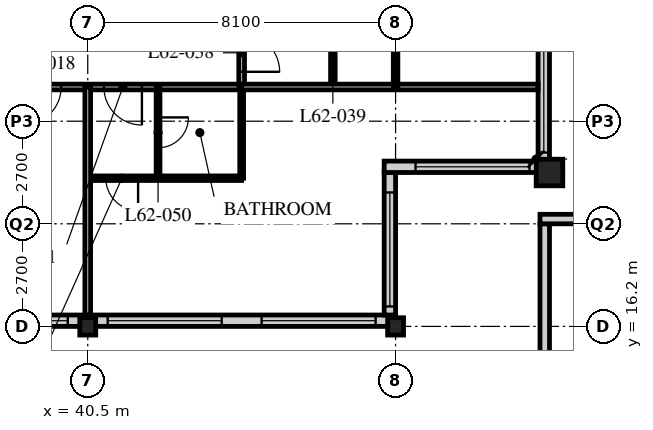
"""IFC4 building model, lengths in metres.
Left out: names, types, materials, properties, quantities, classifications, styles, units other than length and angle.
Written with IfcOpenShell. Run it as: python <this file> out.ifc"""

import sys

from ifc_helpers import new_model, si_unit, direction, frame, frame_2d, origin, origin_2d, place, context, subcontext, project, spatial, rectangle, hollow_rectangle, i_section, extrude, element, fill, save


model = new_model("IFC4")
c1 = context("Model", 3, precision=1e-05, world=origin(), true_north=direction((0.0, 1.0)))
c2 = subcontext(c1, "Body", "Model", "MODEL_VIEW")
j1 = project(units=[si_unit("LENGTHUNIT", "METRE"), si_unit("PLANEANGLEUNIT", "RADIAN")], contexts=[c1])
p1 = place(None, origin())
s1 = spatial("IfcSite", under=j1, at=p1, CompositionType="ELEMENT")
p2 = place(p1, origin())
s2 = spatial("IfcBuilding", under=s1, at=p2, CompositionType="ELEMENT")
p3 = place(p2, frame((0.0, 0.0, 242.4)))
s3 = spatial("IfcBuildingStorey", under=s2, at=p3, CompositionType="ELEMENT", Elevation=242.4)
for number, where, z_axis, x_axis in (
    (1, (40.5, 16.2, 0.0), (0.0, 0.0, 1.0), (1.0, 0.0, 0.0)),
    (2, (48.6, 16.2, 0.0), (0.0, 0.0, 1.0), (1.0, 0.0, 0.0)),
):
    element("IfcColumn", number, at=place(p3, frame(where, z_axis=z_axis, x_axis=x_axis)), inside=s3, PredefinedType="COLUMN", context=c2, shape_type="SweptSolid", body=[
        extrude(i_section(OverallWidth=0.418, OverallDepth=0.456, WebThickness=0.042, FlangeThickness=0.067, FilletRadius=0.015, at=origin_2d()), origin(), (0.0, 0.0, 1.0), 3.9),
    ])
p4 = place(p3, frame((52.65, 20.25, 0.0), z_axis=(0.0, 0.0, 1.0), x_axis=(1.0, 0.0, 0.0)))
e3 = element("IfcColumn", 3, at=p4, inside=s3, PredefinedType="COLUMN", context=c2, shape_type="SweptSolid", body=[
    extrude(hollow_rectangle(XDim=0.7, YDim=0.7, WallThickness=0.07, at=origin_2d()), origin(), (0.0, 0.0, 1.0), 3.9),
])
p5 = place(p3, frame((8.4, 16.35, 0.0), z_axis=(0.0, 0.0, 1.0), x_axis=(1.0, 0.0, 0.0)))
e4 = element("IfcWall", 4, at=p5, inside=s3, PredefinedType="SOLIDWALL", context=c2, shape_type="SweptSolid", body=[
    extrude(rectangle(XDim=40.2, YDim=0.3, at=frame_2d((20.1, 0.0))), origin(), (0.0, 0.0, 1.0), 3.69),
])
p6 = place(p5, frame((21.475, 0.0, 0.0)))
e5 = element("IfcOpeningElement", 5, at=p6, cuts=e4, PredefinedType="OPENING", context=c2, shape_type="SweptSolid", body=[
    extrude(rectangle(XDim=1.0, YDim=2.1, at=frame_2d((0.5, 1.05))), frame((0.0, 0.16, 0.0), z_axis=(0.0, -1.0, 0.0), x_axis=(1.0, 0.0, 0.0)), (0.0, 0.0, 1.0), 0.32),
])
p7 = place(p5, frame((0.225, 0.0, 0.6)))
e6 = element("IfcOpeningElement", 6, at=p7, cuts=e4, PredefinedType="OPENING", context=c2, shape_type="SweptSolid", body=[
    extrude(rectangle(XDim=3.0, YDim=2.3, at=frame_2d((1.5, 1.15))), frame((0.0, 0.16, 0.0), z_axis=(0.0, -1.0, 0.0), x_axis=(1.0, 0.0, 0.0)), (0.0, 0.0, 1.0), 0.32),
])
p8 = place(p5, frame((4.275, 0.0, 0.6)))
e7 = element("IfcOpeningElement", 7, at=p8, cuts=e4, PredefinedType="OPENING", context=c2, shape_type="SweptSolid", body=[
    extrude(rectangle(XDim=3.0, YDim=2.3, at=frame_2d((1.5, 1.15))), frame((0.0, 0.16, 0.0), z_axis=(0.0, -1.0, 0.0), x_axis=(1.0, 0.0, 0.0)), (0.0, 0.0, 1.0), 0.32),
])
p9 = place(p5, frame((8.325, 0.0, 0.6)))
e8 = element("IfcOpeningElement", 8, at=p9, cuts=e4, PredefinedType="OPENING", context=c2, shape_type="SweptSolid", body=[
    extrude(rectangle(XDim=3.0, YDim=2.3, at=frame_2d((1.5, 1.15))), frame((0.0, 0.16, 0.0), z_axis=(0.0, -1.0, 0.0), x_axis=(1.0, 0.0, 0.0)), (0.0, 0.0, 1.0), 0.32),
])
p10 = place(p5, frame((12.375, 0.0, 0.6)))
e9 = element("IfcOpeningElement", 9, at=p10, cuts=e4, PredefinedType="OPENING", context=c2, shape_type="SweptSolid", body=[
    extrude(rectangle(XDim=3.0, YDim=2.3, at=frame_2d((1.5, 1.15))), frame((0.0, 0.16, 0.0), z_axis=(0.0, -1.0, 0.0), x_axis=(1.0, 0.0, 0.0)), (0.0, 0.0, 1.0), 0.32),
])
p11 = place(p5, frame((16.425, 0.0, 0.6)))
e10 = element("IfcOpeningElement", 10, at=p11, cuts=e4, PredefinedType="OPENING", context=c2, shape_type="SweptSolid", body=[
    extrude(rectangle(XDim=3.0, YDim=2.3, at=frame_2d((1.5, 1.15))), frame((0.0, 0.16, 0.0), z_axis=(0.0, -1.0, 0.0), x_axis=(1.0, 0.0, 0.0)), (0.0, 0.0, 1.0), 0.32),
])
p12 = place(p5, frame((24.525, 0.0, 0.6)))
e11 = element("IfcOpeningElement", 11, at=p12, cuts=e4, PredefinedType="OPENING", context=c2, shape_type="SweptSolid", body=[
    extrude(rectangle(XDim=3.0, YDim=2.3, at=frame_2d((1.5, 1.15))), frame((0.0, 0.16, 0.0), z_axis=(0.0, -1.0, 0.0), x_axis=(1.0, 0.0, 0.0)), (0.0, 0.0, 1.0), 0.32),
])
p13 = place(p5, frame((28.575, 0.0, 0.6)))
e12 = element("IfcOpeningElement", 12, at=p13, cuts=e4, PredefinedType="OPENING", context=c2, shape_type="SweptSolid", body=[
    extrude(rectangle(XDim=3.0, YDim=2.3, at=frame_2d((1.5, 1.15))), frame((0.0, 0.16, 0.0), z_axis=(0.0, -1.0, 0.0), x_axis=(1.0, 0.0, 0.0)), (0.0, 0.0, 1.0), 0.32),
])
p14 = place(p5, frame((32.625, 0.0, 0.6)))
e13 = element("IfcOpeningElement", 13, at=p14, cuts=e4, PredefinedType="OPENING", context=c2, shape_type="SweptSolid", body=[
    extrude(rectangle(XDim=3.0, YDim=2.3, at=frame_2d((1.5, 1.15))), frame((0.0, 0.16, 0.0), z_axis=(0.0, -1.0, 0.0), x_axis=(1.0, 0.0, 0.0)), (0.0, 0.0, 1.0), 0.32),
])
p15 = place(p5, frame((36.675, 0.0, 0.6)))
e14 = element("IfcOpeningElement", 14, at=p15, cuts=e4, PredefinedType="OPENING", context=c2, shape_type="SweptSolid", body=[
    extrude(rectangle(XDim=3.0, YDim=2.3, at=frame_2d((1.5, 1.15))), frame((0.0, 0.16, 0.0), z_axis=(0.0, -1.0, 0.0), x_axis=(1.0, 0.0, 0.0)), (0.0, 0.0, 1.0), 0.32),
])
p16 = place(p3, frame((48.45, 16.5, 0.0), z_axis=(0.0, 0.0, 1.0), x_axis=(0.0, 1.0, 0.0)))
e15 = element("IfcWall", 15, at=p16, inside=s3, PredefinedType="SOLIDWALL", context=c2, shape_type="SweptSolid", body=[
    extrude(rectangle(XDim=3.75, YDim=0.3, at=frame_2d((1.875, 0.0))), origin(), (0.0, 0.0, 1.0), 3.69),
])
p17 = place(p16, frame((0.225, 0.0, 0.6)))
e16 = element("IfcOpeningElement", 16, at=p17, cuts=e15, PredefinedType="OPENING", context=c2, shape_type="SweptSolid", body=[
    extrude(rectangle(XDim=3.0, YDim=2.3, at=frame_2d((1.5, 1.15))), frame((0.0, 0.16, 0.0), z_axis=(0.0, -1.0, 0.0), x_axis=(1.0, 0.0, 0.0)), (0.0, 0.0, 1.0), 0.32),
])
p18 = place(p3, frame((48.3, 20.4, 0.0), z_axis=(0.0, 0.0, 1.0), x_axis=(1.0, 0.0, 0.0)))
e17 = element("IfcWall", 17, at=p18, inside=s3, PredefinedType="SOLIDWALL", context=c2, shape_type="SweptSolid", body=[
    extrude(rectangle(XDim=4.35, YDim=0.3, at=frame_2d((2.175, 0.0))), origin(), (0.0, 0.0, 1.0), 3.69),
])
p19 = place(p18, frame((0.825, 0.0, 0.6)))
e18 = element("IfcOpeningElement", 18, at=p19, cuts=e17, PredefinedType="OPENING", context=c2, shape_type="SweptSolid", body=[
    extrude(rectangle(XDim=3.0, YDim=2.3, at=frame_2d((1.5, 1.15))), frame((0.0, 0.16, 0.0), z_axis=(0.0, -1.0, 0.0), x_axis=(1.0, 0.0, 0.0)), (0.0, 0.0, 1.0), 0.32),
])
p20 = place(p3, frame((52.5, 20.55, 0.0), z_axis=(0.0, 0.0, 1.0), x_axis=(0.0, 1.0, 0.0)))
e19 = element("IfcWall", 19, at=p20, inside=s3, PredefinedType="SOLIDWALL", context=c2, shape_type="SweptSolid", body=[
    extrude(rectangle(XDim=3.75, YDim=0.3, at=frame_2d((1.875, 0.0))), origin(), (0.0, 0.0, 1.0), 3.69),
])
p21 = place(p20, frame((0.225, 0.0, 0.6)))
e20 = element("IfcOpeningElement", 20, at=p21, cuts=e19, PredefinedType="OPENING", context=c2, shape_type="SweptSolid", body=[
    extrude(rectangle(XDim=3.0, YDim=2.3, at=frame_2d((1.5, 1.15))), frame((0.0, 0.16, 0.0), z_axis=(0.0, -1.0, 0.0), x_axis=(1.0, 0.0, 0.0)), (0.0, 0.0, 1.0), 0.32),
])
p22 = place(p3, frame((52.525, 15.1, 0.0), z_axis=(0.0, 0.0, 1.0), x_axis=(0.0, 1.0, 0.0)))
e21 = element("IfcWall", 21, at=p22, inside=s3, PredefinedType="PARAPET", context=c2, shape_type="SweptSolid", body=[
    extrude(rectangle(XDim=3.8, YDim=0.25, at=frame_2d((1.9, 0.0))), origin(), (0.0, 0.0, 1.0), 1.38),
])
p23 = place(p3, frame((52.4, 19.025, 0.0), z_axis=(0.0, 0.0, 1.0), x_axis=(1.0, 0.0, 0.0)))
e22 = element("IfcWall", 22, at=p23, inside=s3, PredefinedType="PARAPET", context=c2, shape_type="SweptSolid", body=[
    extrude(rectangle(XDim=4.3, YDim=0.25, at=frame_2d((2.15, 0.0))), origin(), (0.0, 0.0, 1.0), 1.38),
])
p24 = place(p3, frame((12.15, 22.5, 0.0), z_axis=(0.0, 0.0, 1.0), x_axis=(1.0, 0.0, 0.0)))
e23 = element("IfcWall", 23, at=p24, inside=s3, PredefinedType="PARTITIONING", context=c2, shape_type="SweptSolid", body=[
    extrude(rectangle(XDim=32.4, YDim=0.15, at=frame_2d((16.2, 0.0))), origin(), (0.0, 0.0, 1.0), 3.69),
])
p25 = place(p24, frame((6.4, 0.0, 0.0)))
e24 = element("IfcOpeningElement", 24, at=p25, cuts=e23, PredefinedType="OPENING", context=c2, shape_type="SweptSolid", body=[
    extrude(rectangle(XDim=1.0, YDim=2.1, at=frame_2d((0.5, 1.05))), frame((0.0, 0.085, 0.0), z_axis=(0.0, -1.0, 0.0), x_axis=(1.0, 0.0, 0.0)), (0.0, 0.0, 1.0), 0.17),
])
p26 = place(p24, frame((10.45, 0.0, 0.0)))
e25 = element("IfcOpeningElement", 25, at=p26, cuts=e23, PredefinedType="OPENING", context=c2, shape_type="SweptSolid", body=[
    extrude(rectangle(XDim=1.0, YDim=2.1, at=frame_2d((0.5, 1.05))), frame((0.0, 0.085, 0.0), z_axis=(0.0, -1.0, 0.0), x_axis=(1.0, 0.0, 0.0)), (0.0, 0.0, 1.0), 0.17),
])
p27 = place(p24, frame((14.5, 0.0, 0.0)))
e26 = element("IfcOpeningElement", 26, at=p27, cuts=e23, PredefinedType="OPENING", context=c2, shape_type="SweptSolid", body=[
    extrude(rectangle(XDim=1.0, YDim=2.1, at=frame_2d((0.5, 1.05))), frame((0.0, 0.085, 0.0), z_axis=(0.0, -1.0, 0.0), x_axis=(1.0, 0.0, 0.0)), (0.0, 0.0, 1.0), 0.17),
])
p28 = place(p24, frame((17.725, 0.0, 0.0)))
e27 = element("IfcOpeningElement", 27, at=p28, cuts=e23, PredefinedType="OPENING", context=c2, shape_type="SweptSolid", body=[
    extrude(rectangle(XDim=1.0, YDim=2.1, at=frame_2d((0.5, 1.05))), frame((0.0, 0.085, 0.0), z_axis=(0.0, -1.0, 0.0), x_axis=(1.0, 0.0, 0.0)), (0.0, 0.0, 1.0), 0.17),
])
p29 = place(p24, frame((22.6, 0.0, 0.0)))
e28 = element("IfcOpeningElement", 28, at=p29, cuts=e23, PredefinedType="OPENING", context=c2, shape_type="SweptSolid", body=[
    extrude(rectangle(XDim=1.0, YDim=2.1, at=frame_2d((0.5, 1.05))), frame((0.0, 0.085, 0.0), z_axis=(0.0, -1.0, 0.0), x_axis=(1.0, 0.0, 0.0)), (0.0, 0.0, 1.0), 0.17),
])
p30 = place(p24, frame((26.65, 0.0, 0.0)))
e29 = element("IfcOpeningElement", 29, at=p30, cuts=e23, PredefinedType="OPENING", context=c2, shape_type="SweptSolid", body=[
    extrude(rectangle(XDim=1.0, YDim=2.1, at=frame_2d((0.5, 1.05))), frame((0.0, 0.085, 0.0), z_axis=(0.0, -1.0, 0.0), x_axis=(1.0, 0.0, 0.0)), (0.0, 0.0, 1.0), 0.17),
])
p31 = place(p24, frame((2.625, 0.0, 0.0)))
e30 = element("IfcOpeningElement", 30, at=p31, cuts=e23, PredefinedType="OPENING", context=c2, shape_type="SweptSolid", body=[
    extrude(rectangle(XDim=1.0, YDim=2.1, at=frame_2d((0.5, 1.05))), frame((0.0, 0.085, 0.0), z_axis=(0.0, -1.0, 0.0), x_axis=(1.0, 0.0, 0.0)), (0.0, 0.0, 1.0), 0.17),
])
p32 = place(p24, frame((28.775, 0.0, 0.0)))
e31 = element("IfcOpeningElement", 31, at=p32, cuts=e23, PredefinedType="OPENING", context=c2, shape_type="SweptSolid", body=[
    extrude(rectangle(XDim=1.0, YDim=2.1, at=frame_2d((0.5, 1.05))), frame((0.0, 0.085, 0.0), z_axis=(0.0, -1.0, 0.0), x_axis=(1.0, 0.0, 0.0)), (0.0, 0.0, 1.0), 0.17),
])
p33 = place(p3, frame((44.55, 22.5, 0.0), z_axis=(0.0, 0.0, 1.0), x_axis=(0.0, 1.0, 0.0)))
e32 = element("IfcWall", 32, at=p33, inside=s3, PredefinedType="PARTITIONING", context=c2, shape_type="SweptSolid", body=[
    extrude(rectangle(XDim=26.1, YDim=0.15, at=frame_2d((13.05, 0.0))), origin(), (0.0, 0.0, 1.0), 3.69),
])
p34 = place(p33, frame((0.4, 0.0, 0.0)))
e33 = element("IfcOpeningElement", 33, at=p34, cuts=e32, PredefinedType="OPENING", context=c2, shape_type="SweptSolid", body=[
    extrude(rectangle(XDim=1.0, YDim=2.1, at=frame_2d((0.5, 1.05))), frame((0.0, 0.085, 0.0), z_axis=(0.0, -1.0, 0.0), x_axis=(1.0, 0.0, 0.0)), (0.0, 0.0, 1.0), 0.17),
])
p35 = place(p33, frame((10.3, 0.0, 0.0)))
e34 = element("IfcOpeningElement", 34, at=p35, cuts=e32, PredefinedType="OPENING", context=c2, shape_type="SweptSolid", body=[
    extrude(rectangle(XDim=1.0, YDim=2.1, at=frame_2d((0.5, 1.05))), frame((0.0, 0.085, 0.0), z_axis=(0.0, -1.0, 0.0), x_axis=(1.0, 0.0, 0.0)), (0.0, 0.0, 1.0), 0.17),
])
p36 = place(p3, frame((46.95, 22.5, 0.0), z_axis=(0.0, 0.0, 1.0), x_axis=(0.0, 1.0, 0.0)))
e35 = element("IfcWall", 35, at=p36, inside=s3, PredefinedType="PARTITIONING", context=c2, shape_type="SweptSolid", body=[
    extrude(rectangle(XDim=26.1, YDim=0.12, at=frame_2d((13.05, 0.0))), origin(), (0.0, 0.0, 1.0), 3.69),
])
p37 = place(p36, frame((0.975, 0.0, 0.0)))
e36 = element("IfcOpeningElement", 36, at=p37, cuts=e35, PredefinedType="OPENING", context=c2, shape_type="SweptSolid", body=[
    extrude(rectangle(XDim=0.85, YDim=2.1, at=frame_2d((0.425, 1.05))), frame((0.0, 0.07, 0.0), z_axis=(0.0, -1.0, 0.0), x_axis=(1.0, 0.0, 0.0)), (0.0, 0.0, 1.0), 0.14),
])
p38 = place(p36, frame((6.175, 0.0, 0.0)))
e37 = element("IfcOpeningElement", 37, at=p38, cuts=e35, PredefinedType="OPENING", context=c2, shape_type="SweptSolid", body=[
    extrude(rectangle(XDim=0.85, YDim=2.1, at=frame_2d((0.425, 1.05))), frame((0.0, 0.07, 0.0), z_axis=(0.0, -1.0, 0.0), x_axis=(1.0, 0.0, 0.0)), (0.0, 0.0, 1.0), 0.14),
])
p39 = place(p36, frame((10.875, 0.0, 0.0)))
e38 = element("IfcOpeningElement", 38, at=p39, cuts=e35, PredefinedType="OPENING", context=c2, shape_type="SweptSolid", body=[
    extrude(rectangle(XDim=0.85, YDim=2.1, at=frame_2d((0.425, 1.05))), frame((0.0, 0.07, 0.0), z_axis=(0.0, -1.0, 0.0), x_axis=(1.0, 0.0, 0.0)), (0.0, 0.0, 1.0), 0.14),
])
p40 = place(p36, frame((18.325, 0.0, 0.0)))
e39 = element("IfcOpeningElement", 39, at=p40, cuts=e35, PredefinedType="OPENING", context=c2, shape_type="SweptSolid", body=[
    extrude(rectangle(XDim=0.85, YDim=2.1, at=frame_2d((0.425, 1.05))), frame((0.0, 0.07, 0.0), z_axis=(0.0, -1.0, 0.0), x_axis=(1.0, 0.0, 0.0)), (0.0, 0.0, 1.0), 0.14),
])
p41 = place(p36, frame((22.375, 0.0, 0.0)))
e40 = element("IfcOpeningElement", 40, at=p41, cuts=e35, PredefinedType="OPENING", context=c2, shape_type="SweptSolid", body=[
    extrude(rectangle(XDim=0.85, YDim=2.1, at=frame_2d((0.425, 1.05))), frame((0.0, 0.07, 0.0), z_axis=(0.0, -1.0, 0.0), x_axis=(1.0, 0.0, 0.0)), (0.0, 0.0, 1.0), 0.14),
])
p42 = place(p3, frame((40.5, 20.1, 0.0), z_axis=(0.0, 0.0, 1.0), x_axis=(1.0, 0.0, 0.0)))
e41 = element("IfcWall", 41, at=p42, inside=s3, PredefinedType="PARTITIONING", context=c2, shape_type="SweptSolid", body=[
    extrude(rectangle(XDim=4.05, YDim=0.12, at=frame_2d((2.025, 0.0))), origin(), (0.0, 0.0, 1.0), 3.69),
])
p43 = place(p42, frame((0.475, 0.0, 0.0)))
e42 = element("IfcOpeningElement", 42, at=p43, cuts=e41, PredefinedType="OPENING", context=c2, shape_type="SweptSolid", body=[
    extrude(rectangle(XDim=0.85, YDim=2.1, at=frame_2d((0.425, 1.05))), frame((0.0, 0.07, 0.0), z_axis=(0.0, -1.0, 0.0), x_axis=(1.0, 0.0, 0.0)), (0.0, 0.0, 1.0), 0.14),
])
p44 = place(p3, frame((42.35, 22.5, 0.0), z_axis=(0.0, 0.0, 1.0), x_axis=(0.0, -1.0, 0.0)))
e43 = element("IfcWall", 43, at=p44, inside=s3, PredefinedType="PARTITIONING", context=c2, shape_type="SweptSolid", body=[
    extrude(rectangle(XDim=2.4, YDim=0.1, at=frame_2d((1.2, 0.0))), origin(), (0.0, 0.0, 1.0), 3.69),
])
p45 = place(p44, frame((0.8, 0.0, 0.0)))
e44 = element("IfcOpeningElement", 44, at=p45, cuts=e43, PredefinedType="OPENING", context=c2, shape_type="SweptSolid", body=[
    extrude(rectangle(XDim=0.8, YDim=2.1, at=frame_2d((0.4, 1.05))), frame((0.0, 0.06, 0.0), z_axis=(0.0, -1.0, 0.0), x_axis=(1.0, 0.0, 0.0)), (0.0, 0.0, 1.0), 0.12),
])
p46 = place(p3, frame((44.55, 22.5, 0.0), z_axis=(0.0, 0.0, 1.0), x_axis=(0.0, -1.0, 0.0)))
e45 = element("IfcWall", 45, at=p46, inside=s3, PredefinedType="PARTITIONING", context=c2, shape_type="SweptSolid", body=[
    extrude(rectangle(XDim=2.4, YDim=0.1, at=frame_2d((1.2, 0.0))), origin(), (0.0, 0.0, 1.0), 3.69),
])
p47 = place(p3, frame((44.55, 22.5, 0.0), z_axis=(0.0, 0.0, 1.0), x_axis=(1.0, 0.0, 0.0)))
e46 = element("IfcWall", 46, at=p47, inside=s3, PredefinedType="PARTITIONING", context=c2, shape_type="SweptSolid", body=[
    extrude(rectangle(XDim=7.8, YDim=0.15, at=frame_2d((3.9, 0.0))), origin(), (0.0, 0.0, 1.0), 3.69),
])
p48 = place(p3, frame((40.5, 22.5, 0.0), z_axis=(0.0, 0.0, 1.0), x_axis=(0.0, -1.0, 0.0)))
e47 = element("IfcWall", 47, at=p48, inside=s3, PredefinedType="PARTITIONING", context=c2, shape_type="SweptSolid", body=[
    extrude(rectangle(XDim=6.0, YDim=0.15, at=frame_2d((3.0, 0.0))), origin(), (0.0, 0.0, 1.0), 2.928),
])
p49 = place(p3, frame((48.6, 22.5, 0.0), z_axis=(0.0, 0.0, 1.0), x_axis=(0.0, 1.0, 0.0)))
e48 = element("IfcWall", 48, at=p49, inside=s3, PredefinedType="PARTITIONING", context=c2, shape_type="SweptSolid", body=[
    extrude(rectangle(XDim=1.5, YDim=0.12, at=frame_2d((0.75, 0.0))), origin(), (0.0, 0.0, 1.0), 2.928),
])
p50 = place(p13, origin())
e49 = element("IfcWindow", 49, at=p50, inside=s3, PartitioningType="SINGLE_PANEL", PredefinedType="WINDOW", context=c2, shape_type="SweptSolid", body=[
    extrude(rectangle(XDim=3.0, YDim=2.3, at=frame_2d((1.5, 1.15))), frame((0.0, 0.03, 0.0), z_axis=(0.0, -1.0, 0.0), x_axis=(1.0, 0.0, 0.0)), (0.0, 0.0, 1.0), 0.06),
])
fill(e12, e49)
p51 = place(p14, origin())
e50 = element("IfcWindow", 50, at=p51, inside=s3, PartitioningType="SINGLE_PANEL", PredefinedType="WINDOW", context=c2, shape_type="SweptSolid", body=[
    extrude(rectangle(XDim=3.0, YDim=2.3, at=frame_2d((1.5, 1.15))), frame((0.0, 0.03, 0.0), z_axis=(0.0, -1.0, 0.0), x_axis=(1.0, 0.0, 0.0)), (0.0, 0.0, 1.0), 0.06),
])
fill(e13, e50)
p52 = place(p15, origin())
e51 = element("IfcWindow", 51, at=p52, inside=s3, PartitioningType="SINGLE_PANEL", PredefinedType="WINDOW", context=c2, shape_type="SweptSolid", body=[
    extrude(rectangle(XDim=3.0, YDim=2.3, at=frame_2d((1.5, 1.15))), frame((0.0, 0.03, 0.0), z_axis=(0.0, -1.0, 0.0), x_axis=(1.0, 0.0, 0.0)), (0.0, 0.0, 1.0), 0.06),
])
fill(e14, e51)
p53 = place(p17, origin())
e52 = element("IfcWindow", 52, at=p53, inside=s3, PartitioningType="SINGLE_PANEL", PredefinedType="WINDOW", context=c2, shape_type="SweptSolid", body=[
    extrude(rectangle(XDim=3.0, YDim=2.3, at=frame_2d((1.5, 1.15))), frame((0.0, 0.03, 0.0), z_axis=(0.0, -1.0, 0.0), x_axis=(1.0, 0.0, 0.0)), (0.0, 0.0, 1.0), 0.06),
])
fill(e16, e52)
p54 = place(p19, origin())
e53 = element("IfcWindow", 53, at=p54, inside=s3, PartitioningType="SINGLE_PANEL", PredefinedType="WINDOW", context=c2, shape_type="SweptSolid", body=[
    extrude(rectangle(XDim=3.0, YDim=2.3, at=frame_2d((1.5, 1.15))), frame((0.0, 0.03, 0.0), z_axis=(0.0, -1.0, 0.0), x_axis=(1.0, 0.0, 0.0)), (0.0, 0.0, 1.0), 0.06),
])
fill(e18, e53)
p55 = place(p21, origin())
e54 = element("IfcWindow", 54, at=p55, inside=s3, PartitioningType="SINGLE_PANEL", PredefinedType="WINDOW", context=c2, shape_type="SweptSolid", body=[
    extrude(rectangle(XDim=3.0, YDim=2.3, at=frame_2d((1.5, 1.15))), frame((0.0, 0.03, 0.0), z_axis=(0.0, -1.0, 0.0), x_axis=(1.0, 0.0, 0.0)), (0.0, 0.0, 1.0), 0.06),
])
fill(e20, e54)
p56 = place(p30, origin())
e55 = element("IfcDoor", 55, at=p56, inside=s3, OperationType="SINGLE_SWING_RIGHT", PredefinedType="DOOR", context=c2, shape_type="SweptSolid", body=[
    extrude(rectangle(XDim=1.0, YDim=2.1, at=frame_2d((0.5, 1.05))), frame((0.0, 0.025, 0.0), z_axis=(0.0, -1.0, 0.0), x_axis=(1.0, 0.0, 0.0)), (0.0, 0.0, 1.0), 0.05),
])
fill(e29, e55)
p57 = place(p34, origin())
e56 = element("IfcDoor", 56, at=p57, inside=s3, OperationType="SINGLE_SWING_RIGHT", PredefinedType="DOOR", context=c2, shape_type="SweptSolid", body=[
    extrude(rectangle(XDim=1.0, YDim=2.1, at=frame_2d((0.5, 1.05))), frame((0.0, 0.025, 0.0), z_axis=(0.0, -1.0, 0.0), x_axis=(1.0, 0.0, 0.0)), (0.0, 0.0, 1.0), 0.05),
])
fill(e33, e56)
p58 = place(p45, origin())
e57 = element("IfcDoor", 57, at=p58, inside=s3, OperationType="SINGLE_SWING_LEFT", PredefinedType="DOOR", context=c2, shape_type="SweptSolid", body=[
    extrude(rectangle(XDim=0.8, YDim=2.1, at=frame_2d((0.4, 1.05))), frame((0.0, 0.025, 0.0), z_axis=(0.0, -1.0, 0.0), x_axis=(1.0, 0.0, 0.0)), (0.0, 0.0, 1.0), 0.05),
])
fill(e44, e57)
p59 = place(p32, origin())
e58 = element("IfcDoor", 58, at=p59, inside=s3, OperationType="SINGLE_SWING_LEFT", PredefinedType="DOOR", context=c2, shape_type="SweptSolid", body=[
    extrude(rectangle(XDim=1.0, YDim=2.1, at=frame_2d((0.5, 1.05))), frame((0.0, 0.025, 0.0), z_axis=(0.0, -1.0, 0.0), x_axis=(1.0, 0.0, 0.0)), (0.0, 0.0, 1.0), 0.05),
])
fill(e31, e58)
p60 = place(p43, origin())
e59 = element("IfcDoor", 59, at=p60, inside=s3, OperationType="SINGLE_SWING_LEFT", PredefinedType="DOOR", context=c2, shape_type="SweptSolid", body=[
    extrude(rectangle(XDim=0.85, YDim=2.1, at=frame_2d((0.425, 1.05))), frame((0.0, 0.025, 0.0), z_axis=(0.0, -1.0, 0.0), x_axis=(1.0, 0.0, 0.0)), (0.0, 0.0, 1.0), 0.05),
])
fill(e42, e59)
save(model, sys.argv[1])
